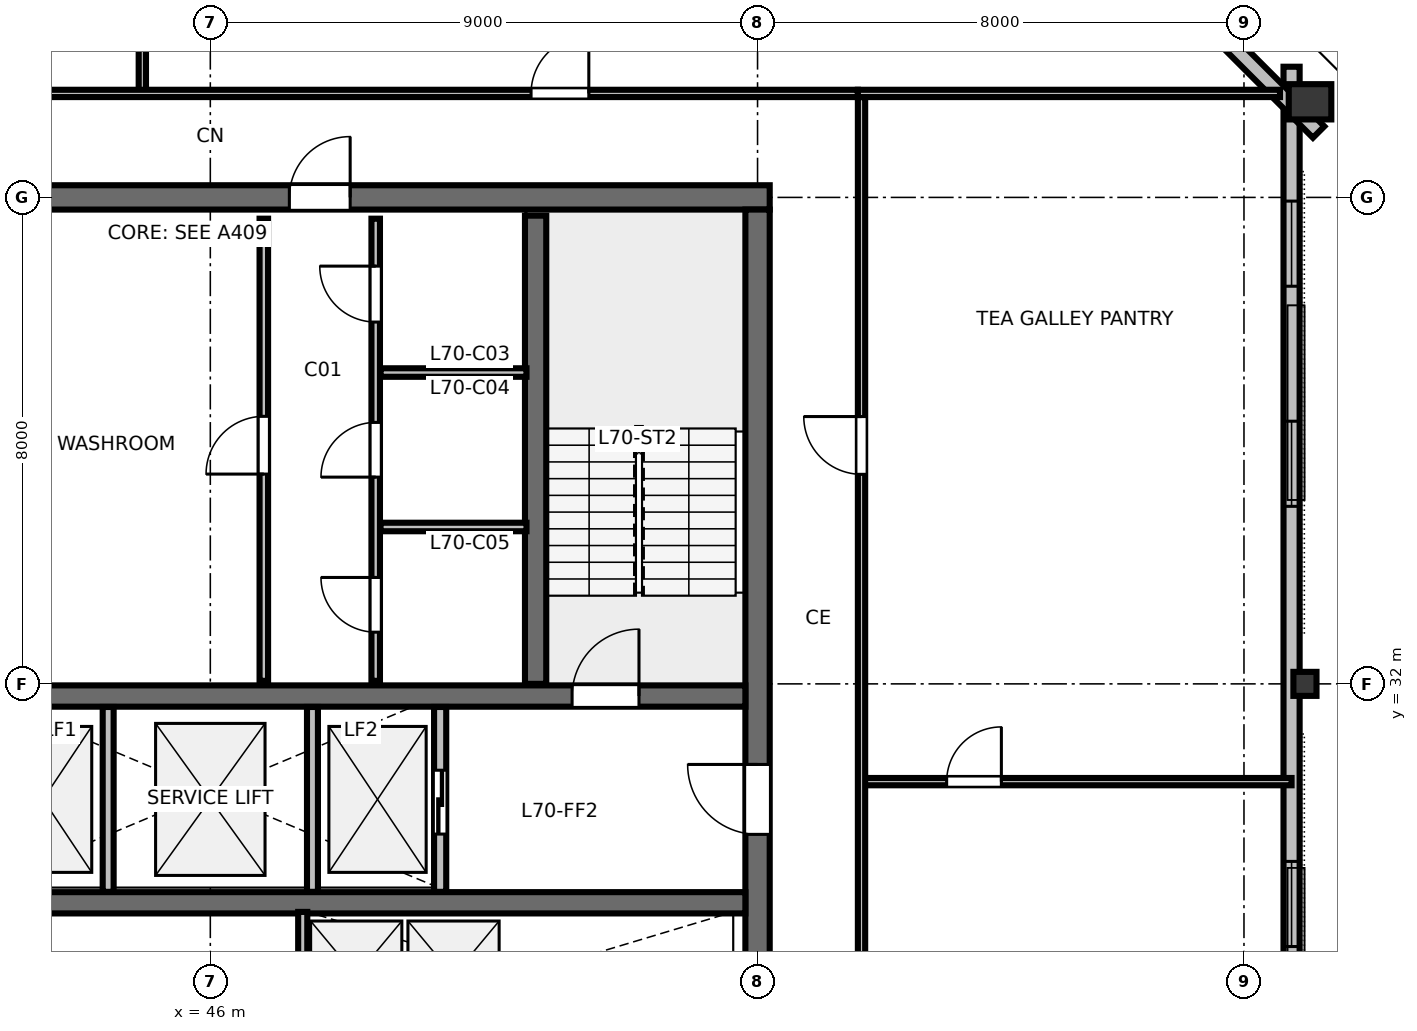
"""IFC4 building model, lengths in metres.
Left out: names, types, materials, properties, quantities, classifications, styles, units other than length and angle.
Written with IfcOpenShell. Run it as: python <this file> out.ifc"""

import sys

from ifc_helpers import new_model, si_unit, direction, frame, frame_2d, origin, origin_2d, place, context, subcontext, project, spatial, rectangle, hollow_rectangle, i_section, extrude, element, fill, save


model = new_model("IFC4")
c1 = context("Model", 3, precision=1e-05, world=origin(), true_north=direction((0.0, 1.0)))
c2 = subcontext(c1, "Body", "Model", "MODEL_VIEW")
j1 = project(units=[si_unit("LENGTHUNIT", "METRE"), si_unit("PLANEANGLEUNIT", "RADIAN")], contexts=[c1])
p1 = place(None, origin())
s1 = spatial("IfcSite", under=j1, at=p1, CompositionType="ELEMENT")
p2 = place(p1, origin())
s2 = spatial("IfcBuilding", under=s1, at=p2, CompositionType="ELEMENT")
p3 = place(p2, frame((0.0, 0.0, 264.6)))
s3 = spatial("IfcBuildingStorey", under=s2, at=p3, CompositionType="ELEMENT", Elevation=264.6)
p4 = place(p3, frame((36.8, 40.0, 0.0), z_axis=(0.0, 0.0, 1.0), x_axis=(1.0, 0.0, 0.0)))
e1 = element("IfcWall", 1, at=p4, inside=s3, PredefinedType="SHEAR", context=c2, shape_type="SweptSolid", body=[
    extrude(rectangle(XDim=18.4, YDim=0.4, at=frame_2d((9.2, 0.0))), origin(), (0.0, 0.0, 1.0), 3.36),
])
p5 = place(p4, frame((10.5, 0.0, 0.0)))
e2 = element("IfcOpeningElement", 2, at=p5, cuts=e1, PredefinedType="OPENING", context=c2, shape_type="SweptSolid", body=[
    extrude(rectangle(XDim=1.0, YDim=2.15, at=frame_2d((0.5, 1.075))), frame((0.0, 0.21, 0.0), z_axis=(0.0, -1.0, 0.0), x_axis=(1.0, 0.0, 0.0)), (0.0, 0.0, 1.0), 0.42),
])
p6 = place(p3, frame((55.0, 24.2, 0.0), z_axis=(0.0, 0.0, 1.0), x_axis=(0.0, 1.0, 0.0)))
e3 = element("IfcWall", 3, at=p6, inside=s3, PredefinedType="SHEAR", context=c2, shape_type="SweptSolid", body=[
    extrude(rectangle(XDim=15.6, YDim=0.4, at=frame_2d((7.8, 0.0))), origin(), (0.0, 0.0, 1.0), 3.36),
])
p7 = place(p6, frame((5.325, 0.0, 0.0)))
e4 = element("IfcOpeningElement", 4, at=p7, cuts=e3, PredefinedType="OPENING", context=c2, shape_type="SweptSolid", body=[
    extrude(rectangle(XDim=1.15, YDim=2.15, at=frame_2d((0.575, 1.075))), frame((0.0, 0.21, 0.0), z_axis=(0.0, -1.0, 0.0), x_axis=(1.0, 0.0, 0.0)), (0.0, 0.0, 1.0), 0.42),
])
p8 = place(p3, frame((37.2, 31.8, 0.0), z_axis=(0.0, 0.0, 1.0), x_axis=(1.0, 0.0, 0.0)))
e5 = element("IfcWall", 5, at=p8, inside=s3, PredefinedType="SHEAR", context=c2, shape_type="SweptSolid", body=[
    extrude(rectangle(XDim=17.6, YDim=0.35, at=frame_2d((8.8, 0.0))), origin(), (0.0, 0.0, 1.0), 3.36),
])
p9 = place(p8, frame((0.85, 0.0, 0.0)))
e6 = element("IfcOpeningElement", 6, at=p9, cuts=e5, PredefinedType="OPENING", context=c2, shape_type="SweptSolid", body=[
    extrude(rectangle(XDim=1.1, YDim=2.15, at=frame_2d((0.55, 1.075))), frame((0.0, 0.185, 0.0), z_axis=(0.0, -1.0, 0.0), x_axis=(1.0, 0.0, 0.0)), (0.0, 0.0, 1.0), 0.37),
])
p10 = place(p8, frame((14.75, 0.0, 0.0)))
e7 = element("IfcOpeningElement", 7, at=p10, cuts=e5, PredefinedType="OPENING", context=c2, shape_type="SweptSolid", body=[
    extrude(rectangle(XDim=1.1, YDim=2.15, at=frame_2d((0.55, 1.075))), frame((0.0, 0.185, 0.0), z_axis=(0.0, -1.0, 0.0), x_axis=(1.0, 0.0, 0.0)), (0.0, 0.0, 1.0), 0.37),
])
p11 = place(p3, frame((37.2, 28.4, 0.0), z_axis=(0.0, 0.0, 1.0), x_axis=(1.0, 0.0, 0.0)))
e8 = element("IfcWall", 8, at=p11, inside=s3, PredefinedType="SHEAR", context=c2, shape_type="SweptSolid", body=[
    extrude(rectangle(XDim=17.6, YDim=0.35, at=frame_2d((8.8, 0.0))), origin(), (0.0, 0.0, 1.0), 3.36),
])
p12 = place(p3, frame((64.003, 32.0, 0.0), z_axis=(0.0, 0.0, 1.0), x_axis=(0.0, 1.0, 0.0)))
e9 = element("IfcColumn", 9, at=p12, inside=s3, PredefinedType="COLUMN", context=c2, shape_type="SweptSolid", body=[
    extrude(i_section(OverallWidth=0.395, OverallDepth=0.38, WebThickness=0.019, FlangeThickness=0.03, FilletRadius=0.025, at=origin_2d()), origin(), (0.0, 0.0, 1.0), 3.373),
])
p13 = place(p3, frame((64.086, 41.572, 0.0), z_axis=(0.0, 0.0, 1.0), x_axis=(0.0, 1.0, 0.0)))
e10 = element("IfcColumn", 10, at=p13, inside=s3, PredefinedType="COLUMN", context=c2, shape_type="SweptSolid", body=[
    extrude(hollow_rectangle(XDim=0.58, YDim=0.7, WallThickness=0.032, at=origin_2d()), origin(), (0.0, 0.0, 1.0), 3.373),
])
p14 = place(p3, frame((63.783, 21.851, 0.0), z_axis=(0.0, 0.0, 1.0), x_axis=(0.0, 1.0, 0.0)))
e11 = element("IfcWall", 11, at=p14, inside=s3, PredefinedType="STANDARD", context=c2, shape_type="SweptSolid", body=[
    extrude(rectangle(XDim=20.298, YDim=0.265, at=frame_2d((10.149, 0.0))), origin(), (0.0, 0.0, 1.0), 2.832),
])
p15 = place(p14, frame((2.21, 0.0, 0.85)))
e12 = element("IfcOpeningElement", 12, at=p15, cuts=e11, PredefinedType="OPENING", context=c2, shape_type="SweptSolid", body=[
    extrude(rectangle(XDim=1.4, YDim=1.2, at=frame_2d((0.7, 0.6))), frame((0.0, 0.142, 0.0), z_axis=(0.0, -1.0, 0.0), x_axis=(1.0, 0.0, 0.0)), (0.0, 0.0, 1.0), 0.285),
])
p16 = place(p14, frame((5.83, 0.0, 0.85)))
e13 = element("IfcOpeningElement", 13, at=p16, cuts=e11, PredefinedType="OPENING", context=c2, shape_type="SweptSolid", body=[
    extrude(rectangle(XDim=1.4, YDim=1.2, at=frame_2d((0.7, 0.6))), frame((0.0, 0.142, 0.0), z_axis=(0.0, -1.0, 0.0), x_axis=(1.0, 0.0, 0.0)), (0.0, 0.0, 1.0), 0.285),
])
p17 = place(p14, frame((13.069, 0.0, 0.85)))
e14 = element("IfcOpeningElement", 14, at=p17, cuts=e11, PredefinedType="OPENING", context=c2, shape_type="SweptSolid", body=[
    extrude(rectangle(XDim=1.4, YDim=1.2, at=frame_2d((0.7, 0.6))), frame((0.0, 0.142, 0.0), z_axis=(0.0, -1.0, 0.0), x_axis=(1.0, 0.0, 0.0)), (0.0, 0.0, 1.0), 0.285),
])
p18 = place(p14, frame((16.688, 0.0, 0.85)))
e15 = element("IfcOpeningElement", 15, at=p18, cuts=e11, PredefinedType="OPENING", context=c2, shape_type="SweptSolid", body=[
    extrude(rectangle(XDim=1.4, YDim=1.2, at=frame_2d((0.7, 0.6))), frame((0.0, 0.142, 0.0), z_axis=(0.0, -1.0, 0.0), x_axis=(1.0, 0.0, 0.0)), (0.0, 0.0, 1.0), 0.285),
])
p19 = place(p3, frame((64.228, 41.075, 0.0), z_axis=(0.0, 0.0, 1.0), x_axis=(-0.707106781187, 0.707106781187, 0.0)))
e16 = element("IfcWall", 16, at=p19, inside=s3, PredefinedType="STANDARD", context=c2, shape_type="SweptSolid", body=[
    extrude(rectangle(XDim=10.971, YDim=0.265, at=frame_2d((5.485, 0.0))), origin(), (0.0, 0.0, 1.0), 2.832),
])
p20 = place(p3, frame((51.35, 32.0, 0.0), z_axis=(0.0, 0.0, 1.0), x_axis=(0.0, 1.0, 0.0)))
e17 = element("IfcWall", 17, at=p20, inside=s3, PredefinedType="SHEAR", context=c2, shape_type="SweptSolid", body=[
    extrude(rectangle(XDim=7.7, YDim=0.35, at=frame_2d((3.85, 0.0))), origin(), (0.0, 0.0, 1.0), 3.6),
])
p21 = place(p3, frame((46.88, 32.05, 0.0), z_axis=(0.0, 0.0, 1.0), x_axis=(0.0, 1.0, 0.0)))
e18 = element("IfcWall", 18, at=p21, inside=s3, PredefinedType="PARTITIONING", context=c2, shape_type="SweptSolid", body=[
    extrude(rectangle(XDim=7.6, YDim=0.14, at=frame_2d((3.8, 0.0))), origin(), (0.0, 0.0, 1.0), 3.375),
])
p22 = place(p21, frame((3.4, 0.0, 0.0)))
e19 = element("IfcOpeningElement", 19, at=p22, cuts=e18, PredefinedType="OPENING", context=c2, shape_type="SweptSolid", body=[
    extrude(rectangle(XDim=0.95, YDim=2.15, at=frame_2d((0.475, 1.075))), frame((0.0, 0.08, 0.0), z_axis=(0.0, -1.0, 0.0), x_axis=(1.0, 0.0, 0.0)), (0.0, 0.0, 1.0), 0.16),
])
p23 = place(p3, frame((48.72, 32.05, 0.0), z_axis=(0.0, 0.0, 1.0), x_axis=(0.0, 1.0, 0.0)))
e20 = element("IfcWall", 20, at=p23, inside=s3, PredefinedType="PARTITIONING", context=c2, shape_type="SweptSolid", body=[
    extrude(rectangle(XDim=7.6, YDim=0.14, at=frame_2d((3.8, 0.0))), origin(), (0.0, 0.0, 1.0), 3.375),
])
p24 = place(p23, frame((0.8, 0.0, 0.0)))
e21 = element("IfcOpeningElement", 21, at=p24, cuts=e20, PredefinedType="OPENING", context=c2, shape_type="SweptSolid", body=[
    extrude(rectangle(XDim=0.9, YDim=2.15, at=frame_2d((0.45, 1.075))), frame((0.0, 0.08, 0.0), z_axis=(0.0, -1.0, 0.0), x_axis=(1.0, 0.0, 0.0)), (0.0, 0.0, 1.0), 0.16),
])
p25 = place(p23, frame((3.35, 0.0, 0.0)))
e22 = element("IfcOpeningElement", 22, at=p25, cuts=e20, PredefinedType="OPENING", context=c2, shape_type="SweptSolid", body=[
    extrude(rectangle(XDim=0.9, YDim=2.15, at=frame_2d((0.45, 1.075))), frame((0.0, 0.08, 0.0), z_axis=(0.0, -1.0, 0.0), x_axis=(1.0, 0.0, 0.0)), (0.0, 0.0, 1.0), 0.16),
])
p26 = place(p23, frame((5.9, 0.0, 0.0)))
e23 = element("IfcOpeningElement", 23, at=p26, cuts=e20, PredefinedType="OPENING", context=c2, shape_type="SweptSolid", body=[
    extrude(rectangle(XDim=0.92, YDim=2.15, at=frame_2d((0.46, 1.075))), frame((0.0, 0.08, 0.0), z_axis=(0.0, -1.0, 0.0), x_axis=(1.0, 0.0, 0.0)), (0.0, 0.0, 1.0), 0.16),
])
for number, where, z_axis, x_axis in (
    (24, (48.8, 34.58, 0.0), (0.0, 0.0, 1.0), (1.0, 0.0, 0.0)),
    (25, (48.8, 37.12, 0.0), (0.0, 0.0, 1.0), (1.0, 0.0, 0.0)),
):
    element("IfcWall", number, at=place(p3, frame(where, z_axis=z_axis, x_axis=x_axis)), inside=s3, PredefinedType="PARTITIONING", context=c2, shape_type="SweptSolid", body=[
        extrude(rectangle(XDim=2.4, YDim=0.14, at=frame_2d((1.2, 0.0))), origin(), (0.0, 0.0, 1.0), 3.375),
    ])
p27 = place(p3, frame((49.78, 28.58, 0.0), z_axis=(0.0, 0.0, 1.0), x_axis=(0.0, 1.0, 0.0)))
e26 = element("IfcWall", 26, at=p27, inside=s3, PredefinedType="PARTITIONING", context=c2, shape_type="SweptSolid", body=[
    extrude(rectangle(XDim=3.04, YDim=0.2, at=frame_2d((1.52, 0.0))), origin(), (0.0, 0.0, 1.0), 3.375),
])
p28 = place(p27, frame((0.95, 0.0, 0.0)))
e27 = element("IfcOpeningElement", 27, at=p28, cuts=e26, PredefinedType="OPENING", context=c2, shape_type="SweptSolid", body=[
    extrude(rectangle(XDim=1.05, YDim=2.15, at=frame_2d((0.525, 1.075))), frame((0.0, 0.11, 0.0), z_axis=(0.0, -1.0, 0.0), x_axis=(1.0, 0.0, 0.0)), (0.0, 0.0, 1.0), 0.22),
])
for number, where, z_axis, x_axis in (
    (28, (44.32, 28.58, 0.0), (0.0, 0.0, 1.0), (0.0, 1.0, 0.0)),
    (29, (47.68, 28.58, 0.0), (0.0, 0.0, 1.0), (0.0, 1.0, 0.0)),
):
    element("IfcWall", number, at=place(p3, frame(where, z_axis=z_axis, x_axis=x_axis)), inside=s3, PredefinedType="PARTITIONING", context=c2, shape_type="SweptSolid", body=[
        extrude(rectangle(XDim=3.04, YDim=0.18, at=frame_2d((1.52, 0.0))), origin(), (0.0, 0.0, 1.0), 3.375),
    ])
p29 = place(p3, frame((47.52, 24.35, 0.0), z_axis=(0.0, 0.0, 1.0), x_axis=(0.0, 1.0, 0.0)))
e30 = element("IfcWall", 30, at=p29, inside=s3, PredefinedType="PARTITIONING", context=c2, shape_type="SweptSolid", body=[
    extrude(rectangle(XDim=3.9, YDim=0.15, at=frame_2d((1.95, 0.0))), origin(), (0.0, 0.0, 1.0), 3.375),
])
p30 = place(p29, frame((0.35, 0.0, 0.0)))
e31 = element("IfcOpeningElement", 31, at=p30, cuts=e30, PredefinedType="OPENING", context=c2, shape_type="SweptSolid", body=[
    extrude(rectangle(XDim=0.9, YDim=2.15, at=frame_2d((0.45, 1.075))), frame((0.0, 0.085, 0.0), z_axis=(0.0, -1.0, 0.0), x_axis=(1.0, 0.0, 0.0)), (0.0, 0.0, 1.0), 0.17),
])
p31 = place(p3, frame((44.882, 41.71, 0.0), z_axis=(0.0, 0.0, 1.0), x_axis=(0.0, 1.0, 0.0)))
e32 = element("IfcWall", 32, at=p31, inside=s3, PredefinedType="PARTITIONING", context=c2, shape_type="SweptSolid", body=[
    extrude(rectangle(XDim=6.677, YDim=0.12, at=frame_2d((3.339, 0.0))), origin(), (0.0, 0.0, 1.0), 2.655),
])
p32 = place(p31, frame((1.4, 0.0, 0.0)))
e33 = element("IfcOpeningElement", 33, at=p32, cuts=e32, PredefinedType="OPENING", context=c2, shape_type="SweptSolid", body=[
    extrude(rectangle(XDim=0.9, YDim=2.15, at=frame_2d((0.45, 1.075))), frame((0.0, 0.07, 0.0), z_axis=(0.0, -1.0, 0.0), x_axis=(1.0, 0.0, 0.0)), (0.0, 0.0, 1.0), 0.14),
])
p33 = place(p3, frame((35.35, 41.71, 0.0), z_axis=(0.0, 0.0, 1.0), x_axis=(1.0, 0.0, 0.0)))
e34 = element("IfcWall", 34, at=p33, inside=s3, PredefinedType="PARTITIONING", context=c2, shape_type="SweptSolid", body=[
    extrude(rectangle(XDim=21.3, YDim=0.12, at=frame_2d((10.65, 0.0))), origin(), (0.0, 0.0, 1.0), 2.655),
])
p34 = place(p33, frame((4.361, 0.0, 0.0)))
e35 = element("IfcOpeningElement", 35, at=p34, cuts=e34, PredefinedType="OPENING", context=c2, shape_type="SweptSolid", body=[
    extrude(rectangle(XDim=0.95, YDim=2.15, at=frame_2d((0.475, 1.075))), frame((0.0, 0.07, 0.0), z_axis=(0.0, -1.0, 0.0), x_axis=(1.0, 0.0, 0.0)), (0.0, 0.0, 1.0), 0.14),
])
p35 = place(p33, frame((15.925, 0.0, 0.0)))
e36 = element("IfcOpeningElement", 36, at=p35, cuts=e34, PredefinedType="OPENING", context=c2, shape_type="SweptSolid", body=[
    extrude(rectangle(XDim=0.95, YDim=2.15, at=frame_2d((0.475, 1.075))), frame((0.0, 0.07, 0.0), z_axis=(0.0, -1.0, 0.0), x_axis=(1.0, 0.0, 0.0)), (0.0, 0.0, 1.0), 0.14),
])
p36 = place(p3, frame((56.71, 30.392, 0.0), z_axis=(0.0, 0.0, 1.0), x_axis=(1.0, 0.0, 0.0)))
e37 = element("IfcWall", 37, at=p36, inside=s3, PredefinedType="PARTITIONING", context=c2, shape_type="SweptSolid", body=[
    extrude(rectangle(XDim=7.073, YDim=0.12, at=frame_2d((3.536, 0.0))), origin(), (0.0, 0.0, 1.0), 2.655),
])
p37 = place(p36, frame((1.4, 0.0, 0.0)))
e38 = element("IfcOpeningElement", 38, at=p37, cuts=e37, PredefinedType="OPENING", context=c2, shape_type="SweptSolid", body=[
    extrude(rectangle(XDim=0.9, YDim=2.15, at=frame_2d((0.45, 1.075))), frame((0.0, 0.07, 0.0), z_axis=(0.0, -1.0, 0.0), x_axis=(1.0, 0.0, 0.0)), (0.0, 0.0, 1.0), 0.14),
])
p38 = place(p3, frame((56.71, 22.35, 0.0), z_axis=(0.0, 0.0, 1.0), x_axis=(0.0, 1.0, 0.0)))
e39 = element("IfcWall", 39, at=p38, inside=s3, PredefinedType="PARTITIONING", context=c2, shape_type="SweptSolid", body=[
    extrude(rectangle(XDim=19.3, YDim=0.12, at=frame_2d((9.65, 0.0))), origin(), (0.0, 0.0, 1.0), 2.655),
])
p39 = place(p38, frame((3.646, 0.0, 0.0)))
e40 = element("IfcOpeningElement", 40, at=p39, cuts=e39, PredefinedType="OPENING", context=c2, shape_type="SweptSolid", body=[
    extrude(rectangle(XDim=0.95, YDim=2.15, at=frame_2d((0.475, 1.075))), frame((0.0, 0.07, 0.0), z_axis=(0.0, -1.0, 0.0), x_axis=(1.0, 0.0, 0.0)), (0.0, 0.0, 1.0), 0.14),
])
p40 = place(p38, frame((13.096, 0.0, 0.0)))
e41 = element("IfcOpeningElement", 41, at=p40, cuts=e39, PredefinedType="OPENING", context=c2, shape_type="SweptSolid", body=[
    extrude(rectangle(XDim=0.95, YDim=2.15, at=frame_2d((0.475, 1.075))), frame((0.0, 0.07, 0.0), z_axis=(0.0, -1.0, 0.0), x_axis=(1.0, 0.0, 0.0)), (0.0, 0.0, 1.0), 0.14),
])
p41 = place(p3, frame((56.65, 41.71, 0.0), z_axis=(0.0, 0.0, 1.0), x_axis=(1.0, 0.0, 0.0)))
e42 = element("IfcWall", 42, at=p41, inside=s3, PredefinedType="PARTITIONING", context=c2, shape_type="SweptSolid", body=[
    extrude(rectangle(XDim=6.942, YDim=0.12, at=frame_2d((3.471, 0.0))), origin(), (0.0, 0.0, 1.0), 2.655),
])
p42 = place(p16, origin())
e43 = element("IfcWindow", 43, at=p42, inside=s3, PartitioningType="SINGLE_PANEL", PredefinedType="WINDOW", context=c2, shape_type="SweptSolid", body=[
    extrude(rectangle(XDim=1.4, YDim=1.2, at=frame_2d((0.7, 0.6))), frame((0.0, 0.03, 0.0), z_axis=(0.0, -1.0, 0.0), x_axis=(1.0, 0.0, 0.0)), (0.0, 0.0, 1.0), 0.06),
])
fill(e13, e43)
p43 = place(p17, origin())
e44 = element("IfcWindow", 44, at=p43, inside=s3, PartitioningType="SINGLE_PANEL", PredefinedType="WINDOW", context=c2, shape_type="SweptSolid", body=[
    extrude(rectangle(XDim=1.4, YDim=1.2, at=frame_2d((0.7, 0.6))), frame((0.0, 0.03, 0.0), z_axis=(0.0, -1.0, 0.0), x_axis=(1.0, 0.0, 0.0)), (0.0, 0.0, 1.0), 0.06),
])
fill(e14, e44)
p44 = place(p18, origin())
e45 = element("IfcWindow", 45, at=p44, inside=s3, PartitioningType="SINGLE_PANEL", PredefinedType="WINDOW", context=c2, shape_type="SweptSolid", body=[
    extrude(rectangle(XDim=1.4, YDim=1.2, at=frame_2d((0.7, 0.6))), frame((0.0, 0.03, 0.0), z_axis=(0.0, -1.0, 0.0), x_axis=(1.0, 0.0, 0.0)), (0.0, 0.0, 1.0), 0.06),
])
fill(e15, e45)
p45 = place(p10, origin())
e46 = element("IfcDoor", 46, at=p45, inside=s3, OperationType="SINGLE_SWING_RIGHT", PredefinedType="DOOR", context=c2, shape_type="SweptSolid", body=[
    extrude(rectangle(XDim=1.1, YDim=2.15, at=frame_2d((0.55, 1.075))), frame((0.0, 0.025, 0.0), z_axis=(0.0, -1.0, 0.0), x_axis=(1.0, 0.0, 0.0)), (0.0, 0.0, 1.0), 0.05),
])
fill(e7, e46)
p46 = place(p5, origin())
e47 = element("IfcDoor", 47, at=p46, inside=s3, OperationType="SINGLE_SWING_RIGHT", PredefinedType="DOOR", context=c2, shape_type="SweptSolid", body=[
    extrude(rectangle(XDim=1.0, YDim=2.15, at=frame_2d((0.5, 1.075))), frame((0.0, 0.025, 0.0), z_axis=(0.0, -1.0, 0.0), x_axis=(1.0, 0.0, 0.0)), (0.0, 0.0, 1.0), 0.05),
])
fill(e2, e47)
p47 = place(p7, origin())
e48 = element("IfcDoor", 48, at=p47, inside=s3, OperationType="SINGLE_SWING_RIGHT", PredefinedType="DOOR", context=c2, shape_type="SweptSolid", body=[
    extrude(rectangle(XDim=1.15, YDim=2.15, at=frame_2d((0.575, 1.075))), frame((0.0, 0.025, 0.0), z_axis=(0.0, -1.0, 0.0), x_axis=(1.0, 0.0, 0.0)), (0.0, 0.0, 1.0), 0.05),
])
fill(e4, e48)
p48 = place(p22, origin())
e49 = element("IfcDoor", 49, at=p48, inside=s3, OperationType="SINGLE_SWING_LEFT", PredefinedType="DOOR", context=c2, shape_type="SweptSolid", body=[
    extrude(rectangle(XDim=0.95, YDim=2.15, at=frame_2d((0.475, 1.075))), frame((0.0, 0.025, 0.0), z_axis=(0.0, -1.0, 0.0), x_axis=(1.0, 0.0, 0.0)), (0.0, 0.0, 1.0), 0.05),
])
fill(e19, e49)
p49 = place(p24, origin())
e50 = element("IfcDoor", 50, at=p49, inside=s3, OperationType="SINGLE_SWING_RIGHT", PredefinedType="DOOR", context=c2, shape_type="SweptSolid", body=[
    extrude(rectangle(XDim=0.9, YDim=2.15, at=frame_2d((0.45, 1.075))), frame((0.0, 0.025, 0.0), z_axis=(0.0, -1.0, 0.0), x_axis=(1.0, 0.0, 0.0)), (0.0, 0.0, 1.0), 0.05),
])
fill(e21, e50)
p50 = place(p25, origin())
e51 = element("IfcDoor", 51, at=p50, inside=s3, OperationType="SINGLE_SWING_LEFT", PredefinedType="DOOR", context=c2, shape_type="SweptSolid", body=[
    extrude(rectangle(XDim=0.9, YDim=2.15, at=frame_2d((0.45, 1.075))), frame((0.0, 0.025, 0.0), z_axis=(0.0, -1.0, 0.0), x_axis=(1.0, 0.0, 0.0)), (0.0, 0.0, 1.0), 0.05),
])
fill(e22, e51)
p51 = place(p26, origin())
e52 = element("IfcDoor", 52, at=p51, inside=s3, OperationType="SINGLE_SWING_RIGHT", PredefinedType="DOOR", context=c2, shape_type="SweptSolid", body=[
    extrude(rectangle(XDim=0.92, YDim=2.15, at=frame_2d((0.46, 1.075))), frame((0.0, 0.025, 0.0), z_axis=(0.0, -1.0, 0.0), x_axis=(1.0, 0.0, 0.0)), (0.0, 0.0, 1.0), 0.05),
])
fill(e23, e52)
p52 = place(p28, origin())
e53 = element("IfcDoor", 53, at=p52, inside=s3, OperationType="SLIDING_TO_RIGHT", PredefinedType="DOOR", context=c2, shape_type="SweptSolid", body=[
    extrude(rectangle(XDim=1.05, YDim=2.15, at=frame_2d((0.525, 1.075))), frame((0.0, 0.025, 0.0), z_axis=(0.0, -1.0, 0.0), x_axis=(1.0, 0.0, 0.0)), (0.0, 0.0, 1.0), 0.05),
])
fill(e27, e53)
p53 = place(p35, origin())
e54 = element("IfcDoor", 54, at=p53, inside=s3, OperationType="SINGLE_SWING_RIGHT", PredefinedType="DOOR", context=c2, shape_type="SweptSolid", body=[
    extrude(rectangle(XDim=0.95, YDim=2.15, at=frame_2d((0.475, 1.075))), frame((0.0, 0.025, 0.0), z_axis=(0.0, -1.0, 0.0), x_axis=(1.0, 0.0, 0.0)), (0.0, 0.0, 1.0), 0.05),
])
fill(e36, e54)
p54 = place(p37, origin())
e55 = element("IfcDoor", 55, at=p54, inside=s3, OperationType="SINGLE_SWING_RIGHT", PredefinedType="DOOR", context=c2, shape_type="SweptSolid", body=[
    extrude(rectangle(XDim=0.9, YDim=2.15, at=frame_2d((0.45, 1.075))), frame((0.0, 0.025, 0.0), z_axis=(0.0, -1.0, 0.0), x_axis=(1.0, 0.0, 0.0)), (0.0, 0.0, 1.0), 0.05),
])
fill(e38, e55)
p55 = place(p40, origin())
e56 = element("IfcDoor", 56, at=p55, inside=s3, OperationType="SINGLE_SWING_RIGHT", PredefinedType="DOOR", context=c2, shape_type="SweptSolid", body=[
    extrude(rectangle(XDim=0.95, YDim=2.15, at=frame_2d((0.475, 1.075))), frame((0.0, 0.025, 0.0), z_axis=(0.0, -1.0, 0.0), x_axis=(1.0, 0.0, 0.0)), (0.0, 0.0, 1.0), 0.05),
])
fill(e41, e56)
save(model, sys.argv[1])
